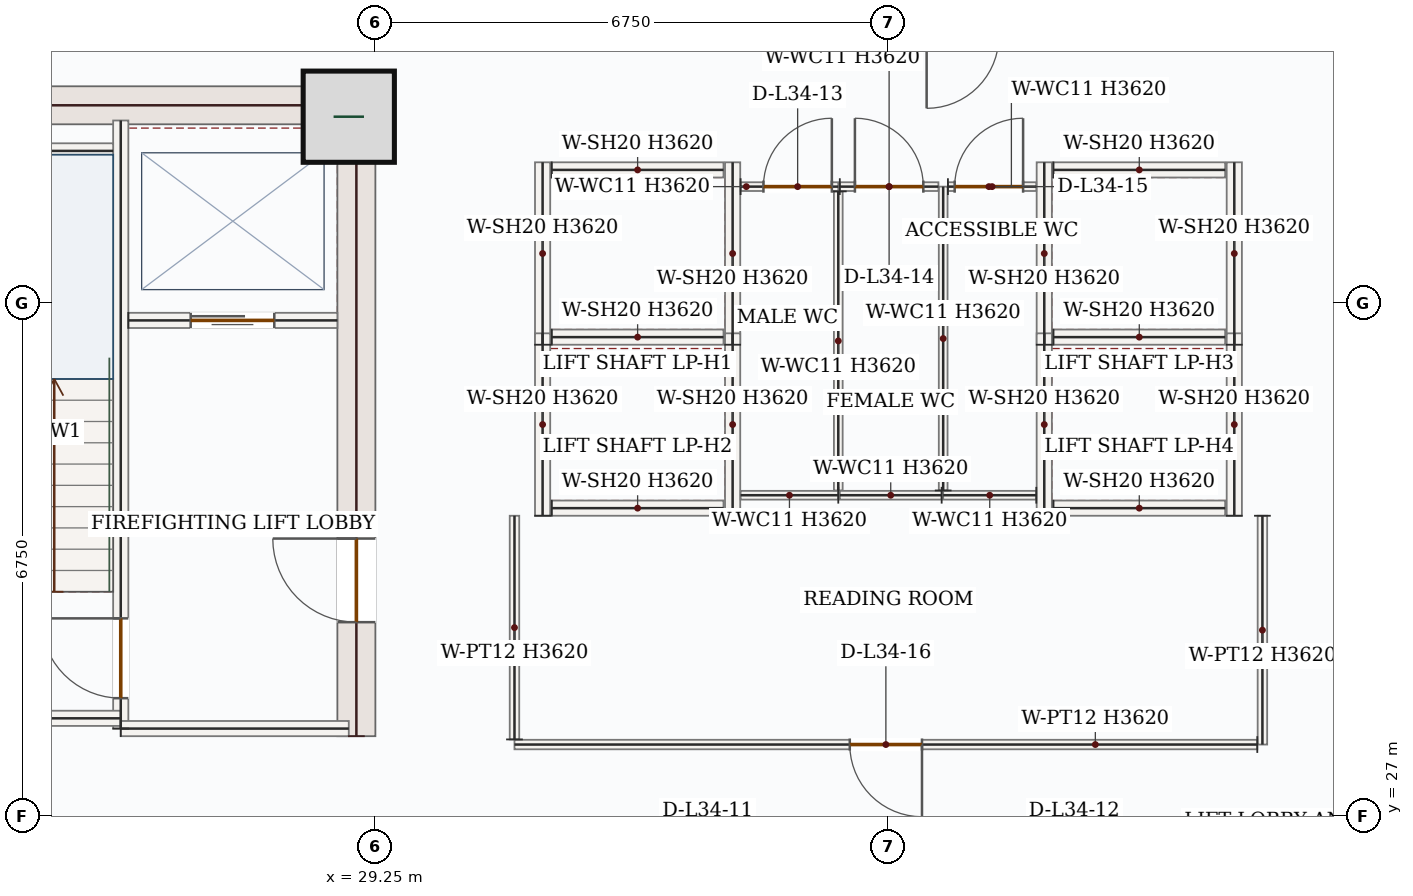
"""IFC4 building model, lengths in metres.
Left out: names, types, materials, properties, quantities, classifications, styles, units other than length and angle.
Written with IfcOpenShell. Run it as: python <this file> out.ifc"""

import sys

from ifc_helpers import new_model, si_unit, direction, frame, frame_2d, origin, origin_2d, place, context, subcontext, project, spatial, rectangle, extrude, source, transform, mapped, element, fill, save


model = new_model("IFC4")
c1 = context("Model", 3, precision=1e-05, world=origin(), true_north=direction((0.0, 1.0)))
c2 = subcontext(c1, "Body", "Model", "MODEL_VIEW")
j1 = project(units=[si_unit("LENGTHUNIT", "METRE"), si_unit("PLANEANGLEUNIT", "RADIAN")], contexts=[c1])
p1 = place(None, origin())
s1 = spatial("IfcSite", under=j1, at=p1, CompositionType="ELEMENT")
p2 = place(p1, origin())
s2 = spatial("IfcBuilding", under=s1, at=p2, CompositionType="ELEMENT")
p3 = place(p2, frame((0.0, 0.0, 151.2)))
s3 = spatial("IfcBuildingStorey", under=s2, at=p3, CompositionType="ELEMENT", Elevation=151.2)
p4 = place(p3, frame((29.0, 28.05, 0.0), z_axis=(0.0, 0.0, 1.0), x_axis=(0.0, 1.0, 0.0)))
e1 = element("IfcWall", 1, at=p4, inside=s3, PredefinedType="SHEAR", context=c2, shape_type="SweptSolid", body=[
    extrude(rectangle(XDim=8.55, YDim=0.5, at=frame_2d((4.275, 0.0))), origin(), (0.0, 0.0, 1.0), 3.62),
])
p5 = place(p4, frame((1.5, 0.0, 0.0)))
e2 = element("IfcOpeningElement", 2, at=p5, cuts=e1, PredefinedType="OPENING", context=c2, shape_type="SweptSolid", body=[
    extrude(rectangle(XDim=1.1, YDim=2.2, at=frame_2d((0.55, 1.1))), frame((0.0, 0.26, 0.0), z_axis=(0.0, -1.0, 0.0), x_axis=(1.0, 0.0, 0.0)), (0.0, 0.0, 1.0), 0.52),
])
m1 = source(origin(), c2, "Body", "SweptSolid", [
    extrude(rectangle(XDim=7.0, YDim=0.5, at=frame_2d((3.5, 0.0))), origin(), (0.0, 0.0, 1.0), 3.62),
])
p6 = place(p3, frame((21.75, 36.35, 0.0), z_axis=(0.0, 0.0, 1.0), x_axis=(1.0, 0.0, 0.0)))
e3 = element("IfcWall", 3, at=p6, inside=s3, PredefinedType="SHEAR", context=c2, shape_type="MappedRepresentation", body=[
    mapped(m1, transform((0.0, 0.0, 0.0), x_axis=(1.0, 0.0, 0.0), y_axis=(0.0, 1.0, 0.0), z_axis=(0.0, 0.0, 1.0), scale=1.0)),
])
m2 = source(origin(), c2, "Body", "SweptSolid", [
    extrude(rectangle(XDim=1.2, YDim=1.2, at=origin_2d()), origin(), (0.0, 0.0, 1.0), 3.9),
])
p7 = place(p3, frame((28.9, 36.2, 0.0), z_axis=(0.0, 0.0, 1.0), x_axis=(1.0, 0.0, 0.0)))
e4 = element("IfcColumn", 4, at=p7, inside=s3, PredefinedType="COLUMN", context=c2, shape_type="MappedRepresentation", body=[
    mapped(m2, transform((0.0, 0.0, 0.0), x_axis=(1.0, 0.0, 0.0), y_axis=(0.0, 1.0, 0.0), z_axis=(0.0, 0.0, 1.0), scale=1.0)),
])
p8 = place(p3, frame((25.9, 28.15, 0.0), z_axis=(0.0, 0.0, 1.0), x_axis=(0.0, 1.0, 0.0)))
e5 = element("IfcWall", 5, at=p8, inside=s3, PredefinedType="SOLIDWALL", context=c2, shape_type="SweptSolid", body=[
    extrude(rectangle(XDim=8.0, YDim=0.2, at=frame_2d((4.0, 0.0))), origin(), (0.0, 0.0, 1.0), 3.62),
])
p9 = place(p8, frame((0.4, 0.0, 0.0)))
e6 = element("IfcOpeningElement", 6, at=p9, cuts=e5, PredefinedType="OPENING", context=c2, shape_type="SweptSolid", body=[
    extrude(rectangle(XDim=1.05, YDim=2.15, at=frame_2d((0.525, 1.075))), frame((0.0, 0.11, 0.0), z_axis=(0.0, -1.0, 0.0), x_axis=(1.0, 0.0, 0.0)), (0.0, 0.0, 1.0), 0.22),
])
m3 = source(origin(), c2, "Body", "SweptSolid", [
    extrude(rectangle(XDim=4.25, YDim=0.2, at=frame_2d((2.125, 0.0))), origin(), (0.0, 0.0, 1.0), 3.62),
])
p10 = place(p3, frame((21.65, 28.285, 0.0), z_axis=(0.0, 0.0, 1.0), x_axis=(1.0, 0.0, 0.0)))
e7 = element("IfcWall", 7, at=p10, inside=s3, PredefinedType="SOLIDWALL", context=c2, shape_type="MappedRepresentation", body=[
    mapped(m3, transform((0.0, 0.0, 0.0), x_axis=(1.0, 0.0, 0.0), y_axis=(0.0, 1.0, 0.0), z_axis=(0.0, 0.0, 1.0), scale=1.0)),
])
m4 = source(origin(), c2, "Body", "SweptSolid", [
    extrude(rectangle(XDim=3.0, YDim=0.2, at=frame_2d((1.5, 0.0))), origin(), (0.0, 0.0, 1.0), 3.62),
])
p11 = place(p3, frame((25.9, 28.15, 0.0), z_axis=(0.0, 0.0, 1.0), x_axis=(1.0, 0.0, 0.0)))
e8 = element("IfcWall", 8, at=p11, inside=s3, PredefinedType="SOLIDWALL", context=c2, shape_type="MappedRepresentation", body=[
    mapped(m4, transform((0.0, 0.0, 0.0), x_axis=(1.0, 0.0, 0.0), y_axis=(0.0, 1.0, 0.0), z_axis=(0.0, 0.0, 1.0), scale=1.0)),
])
m5 = source(origin(), c2, "Body", "SweptSolid", [
    extrude(rectangle(XDim=3.25, YDim=0.2, at=frame_2d((1.625, 0.0))), origin(), (0.0, 0.0, 1.0), 3.62),
])
p12 = place(p3, frame((22.55, 35.75, 0.0), z_axis=(0.0, 0.0, 1.0), x_axis=(1.0, 0.0, 0.0)))
e9 = element("IfcWall", 9, at=p12, inside=s3, PredefinedType="SOLIDWALL", context=c2, shape_type="MappedRepresentation", body=[
    mapped(m5, transform((0.0, 0.0, 0.0), x_axis=(1.0, 0.0, 0.0), y_axis=(0.0, 1.0, 0.0), z_axis=(0.0, 0.0, 1.0), scale=1.0)),
])
p13 = place(p3, frame((26.0, 33.52, 0.0), z_axis=(0.0, 0.0, 1.0), x_axis=(1.0, 0.0, 0.0)))
e10 = element("IfcWall", 10, at=p13, inside=s3, PredefinedType="SOLIDWALL", context=c2, shape_type="SweptSolid", body=[
    extrude(rectangle(XDim=2.75, YDim=0.2, at=frame_2d((1.375, 0.0))), origin(), (0.0, 0.0, 1.0), 3.62),
])
p14 = place(p13, frame((0.82, 0.0, 0.0)))
e11 = element("IfcOpeningElement", 11, at=p14, cuts=e10, PredefinedType="OPENING", context=c2, shape_type="SweptSolid", body=[
    extrude(rectangle(XDim=1.1, YDim=2.15, at=frame_2d((0.55, 1.075))), frame((0.0, 0.11, 0.0), z_axis=(0.0, -1.0, 0.0), x_axis=(1.0, 0.0, 0.0)), (0.0, 0.0, 1.0), 0.22),
])
m6 = source(origin(), c2, "Body", "SweptSolid", [
    extrude(rectangle(XDim=2.4, YDim=0.2, at=frame_2d((1.2, 0.0))), origin(), (0.0, 0.0, 1.0), 3.62),
])
for number, where, z_axis, x_axis in (
    (12, (31.45, 33.2, 0.0), (0.0, 0.0, 1.0), (0.0, 1.0, 0.0)),
    (13, (33.95, 33.2, 0.0), (0.0, 0.0, 1.0), (0.0, 1.0, 0.0)),
):
    element("IfcWall", number, at=place(p3, frame(where, z_axis=z_axis, x_axis=x_axis)), inside=s3, PredefinedType="SOLIDWALL", context=c2, shape_type="MappedRepresentation", body=[
        mapped(m6, transform((0.0, 0.0, 0.0), x_axis=(1.0, 0.0, 0.0), y_axis=(0.0, 1.0, 0.0), z_axis=(0.0, 0.0, 1.0), scale=1.0)),
    ])
m7 = source(origin(), c2, "Body", "SweptSolid", [
    extrude(rectangle(XDim=2.26, YDim=0.2, at=frame_2d((1.13, 0.0))), origin(), (0.0, 0.0, 1.0), 3.62),
])
for number, where, z_axis, x_axis in (
    (14, (31.57, 33.3, 0.0), (0.0, 0.0, 1.0), (1.0, 0.0, 0.0)),
    (15, (31.57, 35.5, 0.0), (0.0, 0.0, 1.0), (1.0, 0.0, 0.0)),
):
    element("IfcWall", number, at=place(p3, frame(where, z_axis=z_axis, x_axis=x_axis)), inside=s3, PredefinedType="SOLIDWALL", context=c2, shape_type="MappedRepresentation", body=[
        mapped(m7, transform((0.0, 0.0, 0.0), x_axis=(1.0, 0.0, 0.0), y_axis=(0.0, 1.0, 0.0), z_axis=(0.0, 0.0, 1.0), scale=1.0)),
    ])
for number, where, z_axis, x_axis in (
    (16, (31.45, 30.95, 0.0), (0.0, 0.0, 1.0), (0.0, 1.0, 0.0)),
    (17, (33.95, 30.95, 0.0), (0.0, 0.0, 1.0), (0.0, 1.0, 0.0)),
):
    element("IfcWall", number, at=place(p3, frame(where, z_axis=z_axis, x_axis=x_axis)), inside=s3, PredefinedType="SOLIDWALL", context=c2, shape_type="MappedRepresentation", body=[
        mapped(m6, transform((0.0, 0.0, 0.0), x_axis=(1.0, 0.0, 0.0), y_axis=(0.0, 1.0, 0.0), z_axis=(0.0, 0.0, 1.0), scale=1.0)),
    ])
p15 = place(p3, frame((31.57, 31.05, 0.0), z_axis=(0.0, 0.0, 1.0), x_axis=(1.0, 0.0, 0.0)))
e18 = element("IfcWall", 18, at=p15, inside=s3, PredefinedType="SOLIDWALL", context=c2, shape_type="MappedRepresentation", body=[
    mapped(m7, transform((0.0, 0.0, 0.0), x_axis=(1.0, 0.0, 0.0), y_axis=(0.0, 1.0, 0.0), z_axis=(0.0, 0.0, 1.0), scale=1.0)),
])
for number, where, z_axis, x_axis in (
    (19, (38.05, 33.2, 0.0), (0.0, 0.0, 1.0), (0.0, 1.0, 0.0)),
    (20, (40.55, 33.2, 0.0), (0.0, 0.0, 1.0), (0.0, 1.0, 0.0)),
):
    element("IfcWall", number, at=place(p3, frame(where, z_axis=z_axis, x_axis=x_axis)), inside=s3, PredefinedType="SOLIDWALL", context=c2, shape_type="MappedRepresentation", body=[
        mapped(m6, transform((0.0, 0.0, 0.0), x_axis=(1.0, 0.0, 0.0), y_axis=(0.0, 1.0, 0.0), z_axis=(0.0, 0.0, 1.0), scale=1.0)),
    ])
for number, where, z_axis, x_axis in (
    (21, (38.17, 33.3, 0.0), (0.0, 0.0, 1.0), (1.0, 0.0, 0.0)),
    (22, (38.17, 35.5, 0.0), (0.0, 0.0, 1.0), (1.0, 0.0, 0.0)),
):
    element("IfcWall", number, at=place(p3, frame(where, z_axis=z_axis, x_axis=x_axis)), inside=s3, PredefinedType="SOLIDWALL", context=c2, shape_type="MappedRepresentation", body=[
        mapped(m7, transform((0.0, 0.0, 0.0), x_axis=(1.0, 0.0, 0.0), y_axis=(0.0, 1.0, 0.0), z_axis=(0.0, 0.0, 1.0), scale=1.0)),
    ])
for number, where, z_axis, x_axis in (
    (23, (38.05, 30.95, 0.0), (0.0, 0.0, 1.0), (0.0, 1.0, 0.0)),
    (24, (40.55, 30.95, 0.0), (0.0, 0.0, 1.0), (0.0, 1.0, 0.0)),
):
    element("IfcWall", number, at=place(p3, frame(where, z_axis=z_axis, x_axis=x_axis)), inside=s3, PredefinedType="SOLIDWALL", context=c2, shape_type="MappedRepresentation", body=[
        mapped(m6, transform((0.0, 0.0, 0.0), x_axis=(1.0, 0.0, 0.0), y_axis=(0.0, 1.0, 0.0), z_axis=(0.0, 0.0, 1.0), scale=1.0)),
    ])
p16 = place(p3, frame((38.17, 31.05, 0.0), z_axis=(0.0, 0.0, 1.0), x_axis=(1.0, 0.0, 0.0)))
e25 = element("IfcWall", 25, at=p16, inside=s3, PredefinedType="SOLIDWALL", context=c2, shape_type="MappedRepresentation", body=[
    mapped(m7, transform((0.0, 0.0, 0.0), x_axis=(1.0, 0.0, 0.0), y_axis=(0.0, 1.0, 0.0), z_axis=(0.0, 0.0, 1.0), scale=1.0)),
])
m8 = source(origin(), c2, "Body", "SweptSolid", [
    extrude(rectangle(XDim=1.225, YDim=0.115, at=frame_2d((0.613, 0.0))), origin(), (0.0, 0.0, 1.0), 3.62),
])
p17 = place(p3, frame((37.945, 31.22, 0.0), z_axis=(0.0, 0.0, 1.0), x_axis=(-1.0, 0.0, 0.0)))
e26 = element("IfcWall", 26, at=p17, inside=s3, PredefinedType="PARTITIONING", context=c2, shape_type="MappedRepresentation", body=[
    mapped(m8, transform((0.0, 0.0, 0.0), x_axis=(1.0, 0.0, 0.0), y_axis=(0.0, 1.0, 0.0), z_axis=(0.0, 0.0, 1.0), scale=1.0)),
])
m9 = source(origin(), c2, "Body", "SweptSolid", [
    extrude(rectangle(XDim=3.998, YDim=0.115, at=frame_2d((1.999, 0.0))), origin(), (0.0, 0.0, 1.0), 3.62),
])
p18 = place(p3, frame((36.72, 31.282, 0.0), z_axis=(0.0, 0.0, 1.0), x_axis=(0.0, 1.0, 0.0)))
e27 = element("IfcWall", 27, at=p18, inside=s3, PredefinedType="PARTITIONING", context=c2, shape_type="MappedRepresentation", body=[
    mapped(m9, transform((0.0, 0.0, 0.0), x_axis=(1.0, 0.0, 0.0), y_axis=(0.0, 1.0, 0.0), z_axis=(0.0, 0.0, 1.0), scale=1.0)),
])
p19 = place(p3, frame((36.782, 35.28, 0.0), z_axis=(0.0, 0.0, 1.0), x_axis=(1.0, 0.0, 0.0)))
e28 = element("IfcWall", 28, at=p19, inside=s3, PredefinedType="PARTITIONING", context=c2, shape_type="SweptSolid", body=[
    extrude(rectangle(XDim=1.163, YDim=0.115, at=frame_2d((0.581, 0.0))), origin(), (0.0, 0.0, 1.0), 3.62),
])
p20 = place(p19, frame((0.089, 0.0, 0.0)))
e29 = element("IfcOpeningElement", 29, at=p20, cuts=e28, PredefinedType="OPENING", context=c2, shape_type="SweptSolid", body=[
    extrude(rectangle(XDim=0.9, YDim=2.1, at=frame_2d((0.45, 1.05))), frame((0.0, 0.067, 0.0), z_axis=(0.0, -1.0, 0.0), x_axis=(1.0, 0.0, 0.0)), (0.0, 0.0, 1.0), 0.135),
])
m10 = source(origin(), c2, "Body", "SweptSolid", [
    extrude(rectangle(XDim=1.285, YDim=0.115, at=frame_2d((0.643, 0.0))), origin(), (0.0, 0.0, 1.0), 3.62),
])
p21 = place(p3, frame((35.34, 31.22, 0.0), z_axis=(0.0, 0.0, 1.0), x_axis=(-1.0, 0.0, 0.0)))
e30 = element("IfcWall", 30, at=p21, inside=s3, PredefinedType="PARTITIONING", context=c2, shape_type="MappedRepresentation", body=[
    mapped(m10, transform((0.0, 0.0, 0.0), x_axis=(1.0, 0.0, 0.0), y_axis=(0.0, 1.0, 0.0), z_axis=(0.0, 0.0, 1.0), scale=1.0)),
])
p22 = place(p3, frame((34.055, 35.28, 0.0), z_axis=(0.0, 0.0, 1.0), x_axis=(1.0, 0.0, 0.0)))
e31 = element("IfcWall", 31, at=p22, inside=s3, PredefinedType="PARTITIONING", context=c2, shape_type="SweptSolid", body=[
    extrude(rectangle(XDim=1.285, YDim=0.115, at=frame_2d((0.643, 0.0))), origin(), (0.0, 0.0, 1.0), 3.62),
])
p23 = place(p22, frame((0.3, 0.0, 0.0)))
e32 = element("IfcOpeningElement", 32, at=p23, cuts=e31, PredefinedType="OPENING", context=c2, shape_type="SweptSolid", body=[
    extrude(rectangle(XDim=0.9, YDim=2.1, at=frame_2d((0.45, 1.05))), frame((0.0, 0.067, 0.0), z_axis=(0.0, -1.0, 0.0), x_axis=(1.0, 0.0, 0.0)), (0.0, 0.0, 1.0), 0.135),
])
m11 = source(origin(), c2, "Body", "SweptSolid", [
    extrude(rectangle(XDim=3.935, YDim=0.115, at=frame_2d((1.968, 0.0))), origin(), (0.0, 0.0, 1.0), 3.62),
])
p24 = place(p3, frame((35.34, 35.218, 0.0), z_axis=(0.0, 0.0, 1.0), x_axis=(0.0, -1.0, 0.0)))
e33 = element("IfcWall", 33, at=p24, inside=s3, PredefinedType="PARTITIONING", context=c2, shape_type="MappedRepresentation", body=[
    mapped(m11, transform((0.0, 0.0, 0.0), x_axis=(1.0, 0.0, 0.0), y_axis=(0.0, 1.0, 0.0), z_axis=(0.0, 0.0, 1.0), scale=1.0)),
])
m12 = source(origin(), c2, "Body", "SweptSolid", [
    extrude(rectangle(XDim=1.34, YDim=0.115, at=frame_2d((0.67, 0.0))), origin(), (0.0, 0.0, 1.0), 3.62),
])
p25 = place(p3, frame((36.7, 31.22, 0.0), z_axis=(0.0, 0.0, 1.0), x_axis=(-1.0, 0.0, 0.0)))
e34 = element("IfcWall", 34, at=p25, inside=s3, PredefinedType="PARTITIONING", context=c2, shape_type="MappedRepresentation", body=[
    mapped(m12, transform((0.0, 0.0, 0.0), x_axis=(1.0, 0.0, 0.0), y_axis=(0.0, 1.0, 0.0), z_axis=(0.0, 0.0, 1.0), scale=1.0)),
])
p26 = place(p3, frame((35.36, 35.28, 0.0), z_axis=(0.0, 0.0, 1.0), x_axis=(1.0, 0.0, 0.0)))
e35 = element("IfcWall", 35, at=p26, inside=s3, PredefinedType="PARTITIONING", context=c2, shape_type="SweptSolid", body=[
    extrude(rectangle(XDim=1.297, YDim=0.115, at=frame_2d((0.649, 0.0))), origin(), (0.0, 0.0, 1.0), 3.62),
])
p27 = place(p26, frame((0.199, 0.0, 0.0)))
e36 = element("IfcOpeningElement", 36, at=p27, cuts=e35, PredefinedType="OPENING", context=c2, shape_type="SweptSolid", body=[
    extrude(rectangle(XDim=0.9, YDim=2.1, at=frame_2d((0.45, 1.05))), frame((0.0, 0.067, 0.0), z_axis=(0.0, -1.0, 0.0), x_axis=(1.0, 0.0, 0.0)), (0.0, 0.0, 1.0), 0.135),
])
m13 = source(origin(), c2, "Body", "SweptSolid", [
    extrude(rectangle(XDim=3.01, YDim=0.125, at=frame_2d((1.505, 0.0))), origin(), (0.0, 0.0, 1.0), 3.62),
])
p28 = place(p3, frame((40.92, 30.95, 0.0), z_axis=(0.0, 0.0, 1.0), x_axis=(0.0, -1.0, 0.0)))
e37 = element("IfcWall", 37, at=p28, inside=s3, PredefinedType="PARTITIONING", context=c2, shape_type="MappedRepresentation", body=[
    mapped(m13, transform((0.0, 0.0, 0.0), x_axis=(1.0, 0.0, 0.0), y_axis=(0.0, 1.0, 0.0), z_axis=(0.0, 0.0, 1.0), scale=1.0)),
])
p29 = place(p3, frame((40.853, 27.94, 0.0), z_axis=(0.0, 0.0, 1.0), x_axis=(-1.0, 0.0, 0.0)))
e38 = element("IfcWall", 38, at=p29, inside=s3, PredefinedType="PARTITIONING", context=c2, shape_type="SweptSolid", body=[
    extrude(rectangle(XDim=9.772, YDim=0.125, at=frame_2d((4.886, 0.0))), origin(), (0.0, 0.0, 1.0), 3.62),
])
p30 = place(p29, frame((4.411, 0.0, 0.0)))
e39 = element("IfcOpeningElement", 39, at=p30, cuts=e38, PredefinedType="OPENING", context=c2, shape_type="SweptSolid", body=[
    extrude(rectangle(XDim=0.95, YDim=2.15, at=frame_2d((0.475, 1.075))), frame((0.0, 0.073, 0.0), z_axis=(0.0, -1.0, 0.0), x_axis=(1.0, 0.0, 0.0)), (0.0, 0.0, 1.0), 0.145),
])
m14 = source(origin(), c2, "Body", "SweptSolid", [
    extrude(rectangle(XDim=2.942, YDim=0.125, at=frame_2d((1.471, 0.0))), origin(), (0.0, 0.0, 1.0), 3.62),
])
p31 = place(p3, frame((31.08, 28.008, 0.0), z_axis=(0.0, 0.0, 1.0), x_axis=(0.0, 1.0, 0.0)))
e40 = element("IfcWall", 40, at=p31, inside=s3, PredefinedType="PARTITIONING", context=c2, shape_type="MappedRepresentation", body=[
    mapped(m14, transform((0.0, 0.0, 0.0), x_axis=(1.0, 0.0, 0.0), y_axis=(0.0, 1.0, 0.0), z_axis=(0.0, 0.0, 1.0), scale=1.0)),
])
m15 = source(origin(), c2, "Body", "SweptSolid", [
    extrude(rectangle(XDim=1.05, YDim=2.15, at=frame_2d((0.525, 1.075))), frame((0.0, 0.025, 0.0), z_axis=(0.0, -1.0, 0.0), x_axis=(1.0, 0.0, 0.0)), (0.0, 0.0, 1.0), 0.05),
])
p32 = place(p9, origin())
e41 = element("IfcDoor", 41, at=p32, inside=s3, OperationType="SINGLE_SWING_RIGHT", PredefinedType="DOOR", context=c2, shape_type="MappedRepresentation", body=[
    mapped(m15, transform((0.0, 0.0, 0.0), x_axis=(1.0, 0.0, 0.0), y_axis=(0.0, 1.0, 0.0), z_axis=(0.0, 0.0, 1.0), scale=1.0)),
])
fill(e6, e41)
m16 = source(origin(), c2, "Body", "SweptSolid", [
    extrude(rectangle(XDim=1.1, YDim=2.15, at=frame_2d((0.55, 1.075))), frame((0.0, 0.025, 0.0), z_axis=(0.0, -1.0, 0.0), x_axis=(1.0, 0.0, 0.0)), (0.0, 0.0, 1.0), 0.05),
])
p33 = place(p14, origin())
e42 = element("IfcDoor", 42, at=p33, inside=s3, OperationType="DOUBLE_DOOR_SLIDING", PredefinedType="DOOR", context=c2, shape_type="MappedRepresentation", body=[
    mapped(m16, transform((0.0, 0.0, 0.0), x_axis=(1.0, 0.0, 0.0), y_axis=(0.0, 1.0, 0.0), z_axis=(0.0, 0.0, 1.0), scale=1.0)),
])
fill(e11, e42)
m17 = source(origin(), c2, "Body", "SweptSolid", [
    extrude(rectangle(XDim=1.1, YDim=2.2, at=frame_2d((0.55, 1.1))), frame((0.0, 0.025, 0.0), z_axis=(0.0, -1.0, 0.0), x_axis=(1.0, 0.0, 0.0)), (0.0, 0.0, 1.0), 0.05),
])
p34 = place(p5, origin())
e43 = element("IfcDoor", 43, at=p34, inside=s3, OperationType="SINGLE_SWING_RIGHT", PredefinedType="DOOR", context=c2, shape_type="MappedRepresentation", body=[
    mapped(m17, transform((0.0, 0.0, 0.0), x_axis=(1.0, 0.0, 0.0), y_axis=(0.0, 1.0, 0.0), z_axis=(0.0, 0.0, 1.0), scale=1.0)),
])
fill(e2, e43)
m18 = source(origin(), c2, "Body", "SweptSolid", [
    extrude(rectangle(XDim=0.9, YDim=2.1, at=frame_2d((0.45, 1.05))), frame((0.0, 0.025, 0.0), z_axis=(0.0, -1.0, 0.0), x_axis=(1.0, 0.0, 0.0)), (0.0, 0.0, 1.0), 0.05),
])
p35 = place(p23, origin())
e44 = element("IfcDoor", 44, at=p35, inside=s3, OperationType="SINGLE_SWING_RIGHT", PredefinedType="DOOR", context=c2, shape_type="MappedRepresentation", body=[
    mapped(m18, transform((0.0, 0.0, 0.0), x_axis=(1.0, 0.0, 0.0), y_axis=(0.0, 1.0, 0.0), z_axis=(0.0, 0.0, 1.0), scale=1.0)),
])
fill(e32, e44)
p36 = place(p27, origin())
e45 = element("IfcDoor", 45, at=p36, inside=s3, OperationType="SINGLE_SWING_LEFT", PredefinedType="DOOR", context=c2, shape_type="MappedRepresentation", body=[
    mapped(m18, transform((0.0, 0.0, 0.0), x_axis=(1.0, 0.0, 0.0), y_axis=(0.0, 1.0, 0.0), z_axis=(0.0, 0.0, 1.0), scale=1.0)),
])
fill(e36, e45)
p37 = place(p20, origin())
e46 = element("IfcDoor", 46, at=p37, inside=s3, OperationType="SINGLE_SWING_RIGHT", PredefinedType="DOOR", context=c2, shape_type="MappedRepresentation", body=[
    mapped(m18, transform((0.0, 0.0, 0.0), x_axis=(1.0, 0.0, 0.0), y_axis=(0.0, 1.0, 0.0), z_axis=(0.0, 0.0, 1.0), scale=1.0)),
])
fill(e29, e46)
m19 = source(origin(), c2, "Body", "SweptSolid", [
    extrude(rectangle(XDim=0.95, YDim=2.15, at=frame_2d((0.475, 1.075))), frame((0.0, 0.025, 0.0), z_axis=(0.0, -1.0, 0.0), x_axis=(1.0, 0.0, 0.0)), (0.0, 0.0, 1.0), 0.05),
])
p38 = place(p30, origin())
e47 = element("IfcDoor", 47, at=p38, inside=s3, OperationType="SINGLE_SWING_LEFT", PredefinedType="DOOR", context=c2, shape_type="MappedRepresentation", body=[
    mapped(m19, transform((0.0, 0.0, 0.0), x_axis=(1.0, 0.0, 0.0), y_axis=(0.0, 1.0, 0.0), z_axis=(0.0, 0.0, 1.0), scale=1.0)),
])
fill(e39, e47)
save(model, sys.argv[1])
